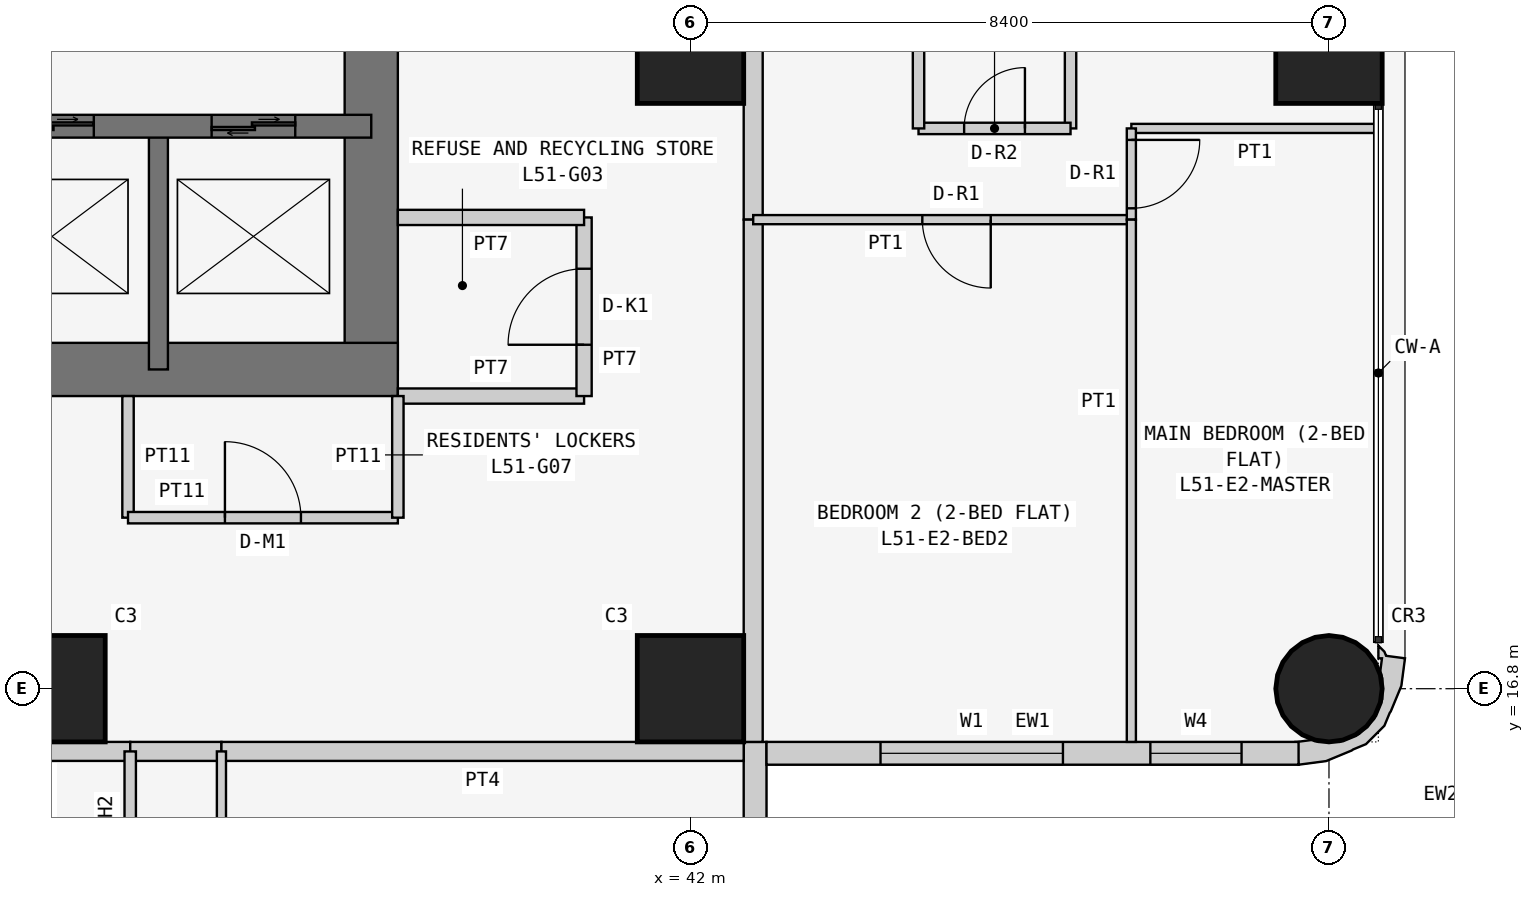
"""IFC4 building model, lengths in metres.
Left out: names, types, materials, properties, quantities, classifications, styles, units other than length and angle.
Written with IfcOpenShell. Run it as: python <this file> out.ifc"""

import sys

from ifc_helpers import new_model, si_unit, direction, frame, frame_2d, origin, origin_2d, place, context, subcontext, project, spatial, polyline, rectangle, circle, outline, extrude, element, fill, save


model = new_model("IFC4")
c1 = context("Model", 3, precision=1e-05, world=origin(), true_north=direction((0.0, 1.0)))
c2 = subcontext(c1, "Body", "Model", "MODEL_VIEW")
j1 = project(units=[si_unit("LENGTHUNIT", "METRE"), si_unit("PLANEANGLEUNIT", "RADIAN")], contexts=[c1])
p1 = place(None, origin())
s1 = spatial("IfcSite", under=j1, at=p1, CompositionType="ELEMENT")
p2 = place(p1, origin())
s2 = spatial("IfcBuilding", under=s1, at=p2, CompositionType="ELEMENT")
p3 = place(p2, frame((0.0, 0.0, 197.7)))
s3 = spatial("IfcBuildingStorey", under=s2, at=p3, CompositionType="ELEMENT", Elevation=197.7)
for number, where, z_axis, x_axis in (
    (1, (33.6, 16.8, 0.0), (0.0, 0.0, 1.0), (1.0, 0.0, 0.0)),
    (2, (42.0, 16.8, 0.0), (0.0, 0.0, 1.0), (1.0, 0.0, 0.0)),
    (3, (42.0, 25.2, 0.0), (0.0, 0.0, 1.0), (1.0, 0.0, 0.0)),
):
    element("IfcColumn", number, at=place(p3, frame(where, z_axis=z_axis, x_axis=x_axis)), inside=s3, PredefinedType="COLUMN", context=c2, shape_type="SweptSolid", body=[
        extrude(rectangle(XDim=1.4, YDim=1.4, at=origin_2d()), origin(), (0.0, 0.0, 1.0), 3.6),
    ])
p4 = place(p3, frame((50.4, 16.8, 0.0), z_axis=(0.0, 0.0, 1.0), x_axis=(1.0, 0.0, 0.0)))
e4 = element("IfcColumn", 4, at=p4, inside=s3, PredefinedType="COLUMN", context=c2, shape_type="SweptSolid", body=[
    extrude(circle(Radius=0.7, at=origin_2d()), origin(), (0.0, 0.0, 1.0), 3.6),
])
p5 = place(p3, frame((50.4, 25.2, 0.0), z_axis=(0.0, 0.0, 1.0), x_axis=(1.0, 0.0, 0.0)))
e5 = element("IfcColumn", 5, at=p5, inside=s3, PredefinedType="COLUMN", context=c2, shape_type="SweptSolid", body=[
    extrude(rectangle(XDim=1.4, YDim=1.4, at=origin_2d()), origin(), (0.0, 0.0, 1.0), 3.6),
])
p6 = place(p3, frame((21.0, 21.0, 0.0), z_axis=(0.0, 0.0, 1.0), x_axis=(1.0, 0.0, 0.0)))
e6 = element("IfcWall", 6, at=p6, inside=s3, PredefinedType="SHEAR", context=c2, shape_type="SweptSolid", body=[
    extrude(rectangle(XDim=17.15, YDim=0.7, at=frame_2d((8.575, 0.0))), origin(), (0.0, 0.0, 1.0), 3.6),
])
p7 = place(p3, frame((37.8, 21.0, 0.0), z_axis=(0.0, 0.0, 1.0), x_axis=(0.0, 1.0, 0.0)))
e7 = element("IfcWall", 7, at=p7, inside=s3, PredefinedType="SHEAR", context=c2, shape_type="SweptSolid", body=[
    extrude(rectangle(XDim=17.15, YDim=0.7, at=frame_2d((8.575, 0.0))), origin(), (0.0, 0.0, 1.0), 3.6),
])
p8 = place(p7, frame((5.2, 0.0, 0.0)))
e8 = element("IfcOpeningElement", 8, at=p8, cuts=e7, PredefinedType="OPENING", context=c2, shape_type="SweptSolid", body=[
    extrude(rectangle(XDim=1.2, YDim=2.1, at=frame_2d((0.6, 1.05))), frame((0.0, 0.36, 0.0), z_axis=(0.0, -1.0, 0.0), x_axis=(1.0, 0.0, 0.0)), (0.0, 0.0, 1.0), 0.72),
])
p9 = place(p3, frame((26.6, 24.2, 0.0), z_axis=(0.0, 0.0, 1.0), x_axis=(1.0, 0.0, 0.0)))
e9 = element("IfcWall", 9, at=p9, inside=s3, PredefinedType="SHEAR", context=c2, shape_type="SweptSolid", body=[
    extrude(rectangle(XDim=11.2, YDim=0.3, at=frame_2d((5.6, 0.0))), origin(), (0.0, 0.0, 1.0), 3.6),
])
p10 = place(p9, frame((0.913, 0.0, 0.0)))
e10 = element("IfcOpeningElement", 10, at=p10, cuts=e9, PredefinedType="OPENING", context=c2, shape_type="SweptSolid", body=[
    extrude(rectangle(XDim=1.0, YDim=2.1, at=frame_2d((0.5, 1.05))), frame((0.0, 0.16, 0.0), z_axis=(0.0, -1.0, 0.0), x_axis=(1.0, 0.0, 0.0)), (0.0, 0.0, 1.0), 0.32),
])
p11 = place(p9, frame((3.75, 0.0, 0.0)))
e11 = element("IfcOpeningElement", 11, at=p11, cuts=e9, PredefinedType="OPENING", context=c2, shape_type="SweptSolid", body=[
    extrude(rectangle(XDim=0.9, YDim=2.1, at=frame_2d((0.45, 1.05))), frame((0.0, 0.16, 0.0), z_axis=(0.0, -1.0, 0.0), x_axis=(1.0, 0.0, 0.0)), (0.0, 0.0, 1.0), 0.32),
])
p12 = place(p9, frame((6.45, 0.0, 0.0)))
e12 = element("IfcOpeningElement", 12, at=p12, cuts=e9, PredefinedType="OPENING", context=c2, shape_type="SweptSolid", body=[
    extrude(rectangle(XDim=1.1, YDim=2.1, at=frame_2d((0.55, 1.05))), frame((0.0, 0.16, 0.0), z_axis=(0.0, -1.0, 0.0), x_axis=(1.0, 0.0, 0.0)), (0.0, 0.0, 1.0), 0.32),
])
p13 = place(p9, frame((9.1, 0.0, 0.0)))
e13 = element("IfcOpeningElement", 13, at=p13, cuts=e9, PredefinedType="OPENING", context=c2, shape_type="SweptSolid", body=[
    extrude(rectangle(XDim=1.1, YDim=2.1, at=frame_2d((0.55, 1.05))), frame((0.0, 0.16, 0.0), z_axis=(0.0, -1.0, 0.0), x_axis=(1.0, 0.0, 0.0)), (0.0, 0.0, 1.0), 0.32),
])
p14 = place(p3, frame((35.0, 21.0, 0.0), z_axis=(0.0, 0.0, 1.0), x_axis=(0.0, 1.0, 0.0)))
e14 = element("IfcWall", 14, at=p14, inside=s3, PredefinedType="SHEAR", context=c2, shape_type="SweptSolid", body=[
    extrude(rectangle(XDim=3.2, YDim=0.25, at=frame_2d((1.6, 0.0))), origin(), (0.0, 0.0, 1.0), 3.6),
])
p15 = place(p3, frame((42.85, 8.8, 0.0), z_axis=(0.0, 0.0, 1.0), x_axis=(0.0, 1.0, 0.0)))
e15 = element("IfcWall", 15, at=p15, inside=s3, PredefinedType="SOLIDWALL", context=c2, shape_type="SweptSolid", body=[
    extrude(rectangle(XDim=7.3, YDim=0.3, at=frame_2d((3.65, 0.0))), origin(), (0.0, 0.0, 1.0), 3.45),
])
p16 = place(p15, frame((3.1, 0.0, 0.9)))
e16 = element("IfcOpeningElement", 16, at=p16, cuts=e15, PredefinedType="OPENING", context=c2, shape_type="SweptSolid", body=[
    extrude(rectangle(XDim=2.4, YDim=1.5, at=frame_2d((1.2, 0.75))), frame((0.0, 0.16, 0.0), z_axis=(0.0, -1.0, 0.0), x_axis=(1.0, 0.0, 0.0)), (0.0, 0.0, 1.0), 0.32),
])
p17 = place(p15, frame((0.75, 0.0, 0.9)))
e17 = element("IfcOpeningElement", 17, at=p17, cuts=e15, PredefinedType="OPENING", context=c2, shape_type="SweptSolid", body=[
    extrude(rectangle(XDim=1.2, YDim=1.5, at=frame_2d((0.6, 0.75))), frame((0.0, 0.16, 0.0), z_axis=(0.0, -1.0, 0.0), x_axis=(1.0, 0.0, 0.0)), (0.0, 0.0, 1.0), 0.32),
])
p18 = place(p3, frame((43.0, 15.95, 0.0), z_axis=(0.0, 0.0, 1.0), x_axis=(1.0, 0.0, 0.0)))
e18 = element("IfcWall", 18, at=p18, inside=s3, PredefinedType="SOLIDWALL", context=c2, shape_type="SweptSolid", body=[
    extrude(rectangle(XDim=7.0, YDim=0.3, at=frame_2d((3.5, 0.0))), origin(), (0.0, 0.0, 1.0), 3.45),
])
p19 = place(p18, frame((1.5, 0.0, 0.9)))
e19 = element("IfcOpeningElement", 19, at=p19, cuts=e18, PredefinedType="OPENING", context=c2, shape_type="SweptSolid", body=[
    extrude(rectangle(XDim=2.4, YDim=1.5, at=frame_2d((1.2, 0.75))), frame((0.0, 0.16, 0.0), z_axis=(0.0, -1.0, 0.0), x_axis=(1.0, 0.0, 0.0)), (0.0, 0.0, 1.0), 0.32),
])
p20 = place(p18, frame((5.05, 0.0, 0.9)))
e20 = element("IfcOpeningElement", 20, at=p20, cuts=e18, PredefinedType="OPENING", context=c2, shape_type="SweptSolid", body=[
    extrude(rectangle(XDim=1.2, YDim=1.5, at=frame_2d((0.6, 0.75))), frame((0.0, 0.16, 0.0), z_axis=(0.0, -1.0, 0.0), x_axis=(1.0, 0.0, 0.0)), (0.0, 0.0, 1.0), 0.32),
])
p21 = place(p3, frame((50.11, 16.076, 0.0), z_axis=(0.0, 0.0, 1.0), x_axis=(0.898030234854, -0.439933741929, 0.0)))
e21 = element("IfcWall", 21, at=p21, inside=s3, PredefinedType="SOLIDWALL", context=c2, shape_type="SweptSolid", body=[
    extrude(outline(polyline([(0.664, 1.577), (0.426, 1.497), (0.382, 1.536), (0.276, 1.572), (0.349, 1.423), (0.392, 1.444), (0.453, 1.261), (0.51, 1.211), (0.632, 0.961), (0.65, 0.683), (0.56, 0.419), (0.375, 0.21), (0.125, 0.087), (0.05, 0.082), (-0.128, -0.035), (-0.145, -0.044), (0.022, -0.296), (0.327, -0.094), (0.568, 0.18), (0.577, 0.199), (0.7, 0.337), (0.811, 0.661), (0.799, 0.846), (0.803, 0.866), (0.78, 1.231), (0.664, 1.577)])), origin(), (0.0, 0.0, 1.0), 3.45),
])
p22 = place(p3, frame((38.15, 20.65, 0.0), z_axis=(0.0, 0.0, 1.0), x_axis=(1.0, 0.0, 0.0)))
e22 = element("IfcWall", 22, at=p22, inside=s3, PredefinedType="PARTITIONING", context=c2, shape_type="SweptSolid", body=[
    extrude(rectangle(XDim=2.45, YDim=0.2, at=frame_2d((1.225, 0.0))), origin(), (0.0, 0.0, 1.0), 3.45),
])
p23 = place(p3, frame((40.6, 20.65, 0.0), z_axis=(0.0, 0.0, 1.0), x_axis=(0.0, 1.0, 0.0)))
e23 = element("IfcWall", 23, at=p23, inside=s3, PredefinedType="PARTITIONING", context=c2, shape_type="SweptSolid", body=[
    extrude(rectangle(XDim=2.35, YDim=0.2, at=frame_2d((1.175, 0.0))), origin(), (0.0, 0.0, 1.0), 3.45),
])
p24 = place(p23, frame((0.675, 0.0, 0.0)))
e24 = element("IfcOpeningElement", 24, at=p24, cuts=e23, PredefinedType="OPENING", context=c2, shape_type="SweptSolid", body=[
    extrude(rectangle(XDim=1.0, YDim=2.1, at=frame_2d((0.5, 1.05))), frame((0.0, 0.11, 0.0), z_axis=(0.0, -1.0, 0.0), x_axis=(1.0, 0.0, 0.0)), (0.0, 0.0, 1.0), 0.22),
])
p25 = place(p3, frame((40.6, 23.0, 0.0), z_axis=(0.0, 0.0, 1.0), x_axis=(-1.0, 0.0, 0.0)))
e25 = element("IfcWall", 25, at=p25, inside=s3, PredefinedType="PARTITIONING", context=c2, shape_type="SweptSolid", body=[
    extrude(rectangle(XDim=2.45, YDim=0.2, at=frame_2d((1.225, 0.0))), origin(), (0.0, 0.0, 1.0), 3.45),
])
p26 = place(p3, frame((34.6, 20.65, 0.0), z_axis=(0.0, 0.0, 1.0), x_axis=(0.0, -1.0, 0.0)))
e26 = element("IfcWall", 26, at=p26, inside=s3, PredefinedType="PARTITIONING", context=c2, shape_type="SweptSolid", body=[
    extrude(rectangle(XDim=1.6, YDim=0.15, at=frame_2d((0.8, 0.0))), origin(), (0.0, 0.0, 1.0), 3.45),
])
p27 = place(p3, frame((34.6, 19.05, 0.0), z_axis=(0.0, 0.0, 1.0), x_axis=(1.0, 0.0, 0.0)))
e27 = element("IfcWall", 27, at=p27, inside=s3, PredefinedType="PARTITIONING", context=c2, shape_type="SweptSolid", body=[
    extrude(rectangle(XDim=3.55, YDim=0.15, at=frame_2d((1.775, 0.0))), origin(), (0.0, 0.0, 1.0), 3.45),
])
p28 = place(p27, frame((1.275, 0.0, 0.0)))
e28 = element("IfcOpeningElement", 28, at=p28, cuts=e27, PredefinedType="OPENING", context=c2, shape_type="SweptSolid", body=[
    extrude(rectangle(XDim=1.0, YDim=2.1, at=frame_2d((0.5, 1.05))), frame((0.0, 0.085, 0.0), z_axis=(0.0, -1.0, 0.0), x_axis=(1.0, 0.0, 0.0)), (0.0, 0.0, 1.0), 0.17),
])
p29 = place(p3, frame((38.15, 19.05, 0.0), z_axis=(0.0, 0.0, 1.0), x_axis=(0.0, 1.0, 0.0)))
e29 = element("IfcWall", 29, at=p29, inside=s3, PredefinedType="PARTITIONING", context=c2, shape_type="SweptSolid", body=[
    extrude(rectangle(XDim=1.6, YDim=0.15, at=frame_2d((0.8, 0.0))), origin(), (0.0, 0.0, 1.0), 3.45),
])
p30 = place(p3, frame((42.825, 29.4, 0.0), z_axis=(0.0, 0.0, 1.0), x_axis=(0.0, -1.0, 0.0)))
e30 = element("IfcWall", 30, at=p30, inside=s3, PredefinedType="PARTITIONING", context=c2, shape_type="SweptSolid", body=[
    extrude(rectangle(XDim=6.429, YDim=0.25, at=frame_2d((3.214, 0.0))), origin(), (0.0, 0.0, 1.0), 3.45),
])
p31 = place(p30, frame((0.5, 0.0, 0.0)))
e31 = element("IfcOpeningElement", 31, at=p31, cuts=e30, PredefinedType="OPENING", context=c2, shape_type="SweptSolid", body=[
    extrude(rectangle(XDim=1.0, YDim=2.1, at=frame_2d((0.5, 1.05))), frame((0.0, 0.135, 0.0), z_axis=(0.0, -1.0, 0.0), x_axis=(1.0, 0.0, 0.0)), (0.0, 0.0, 1.0), 0.27),
])
p32 = place(p3, frame((42.825, 22.971, 0.0), z_axis=(0.0, 0.0, 1.0), x_axis=(0.0, -1.0, 0.0)))
e32 = element("IfcWall", 32, at=p32, inside=s3, PredefinedType="PARTITIONING", context=c2, shape_type="SweptSolid", body=[
    extrude(rectangle(XDim=6.871, YDim=0.25, at=frame_2d((3.436, 0.0))), origin(), (0.0, 0.0, 1.0), 3.45),
])
p33 = place(p3, frame((34.629, 15.975, 0.0), z_axis=(0.0, 0.0, 1.0), x_axis=(-1.0, 0.0, 0.0)))
e33 = element("IfcWall", 33, at=p33, inside=s3, PredefinedType="PARTITIONING", context=c2, shape_type="SweptSolid", body=[
    extrude(rectangle(XDim=2.629, YDim=0.25, at=frame_2d((1.314, 0.0))), origin(), (0.0, 0.0, 1.0), 3.45),
])
p34 = place(p3, frame((35.829, 15.975, 0.0), z_axis=(0.0, 0.0, 1.0), x_axis=(-1.0, 0.0, 0.0)))
e34 = element("IfcWall", 34, at=p34, inside=s3, PredefinedType="PARTITIONING", context=c2, shape_type="SweptSolid", body=[
    extrude(rectangle(XDim=1.2, YDim=0.25, at=frame_2d((0.6, 0.0))), origin(), (0.0, 0.0, 1.0), 3.45),
])
p35 = place(p3, frame((42.7, 15.975, 0.0), z_axis=(0.0, 0.0, 1.0), x_axis=(-1.0, 0.0, 0.0)))
e35 = element("IfcWall", 35, at=p35, inside=s3, PredefinedType="PARTITIONING", context=c2, shape_type="SweptSolid", body=[
    extrude(rectangle(XDim=6.871, YDim=0.25, at=frame_2d((3.436, 0.0))), origin(), (0.0, 0.0, 1.0), 3.45),
])
p36 = place(p3, frame((47.0, 29.4, 0.0), z_axis=(0.0, 0.0, 1.0), x_axis=(0.0, -1.0, 0.0)))
e36 = element("IfcWall", 36, at=p36, inside=s3, PredefinedType="PARTITIONING", context=c2, shape_type="SweptSolid", body=[
    extrude(rectangle(XDim=5.229, YDim=0.15, at=frame_2d((2.615, 0.0))), origin(), (0.0, 0.0, 1.0), 3.45),
])
p37 = place(p3, frame((47.0, 24.171, 0.0), z_axis=(0.0, 0.0, 1.0), x_axis=(-1.0, 0.0, 0.0)))
e37 = element("IfcWall", 37, at=p37, inside=s3, PredefinedType="PARTITIONING", context=c2, shape_type="SweptSolid", body=[
    extrude(rectangle(XDim=2.0, YDim=0.15, at=frame_2d((1.0, 0.0))), origin(), (0.0, 0.0, 1.0), 3.45),
])
p38 = place(p37, frame((0.6, 0.0, 0.0)))
e38 = element("IfcOpeningElement", 38, at=p38, cuts=e37, PredefinedType="OPENING", context=c2, shape_type="SweptSolid", body=[
    extrude(rectangle(XDim=0.8, YDim=2.1, at=frame_2d((0.4, 1.05))), frame((0.0, 0.085, 0.0), z_axis=(0.0, -1.0, 0.0), x_axis=(1.0, 0.0, 0.0)), (0.0, 0.0, 1.0), 0.17),
])
p39 = place(p3, frame((45.0, 24.171, 0.0), z_axis=(0.0, 0.0, 1.0), x_axis=(0.0, 1.0, 0.0)))
e39 = element("IfcWall", 39, at=p39, inside=s3, PredefinedType="PARTITIONING", context=c2, shape_type="SweptSolid", body=[
    extrude(rectangle(XDim=5.229, YDim=0.15, at=frame_2d((2.615, 0.0))), origin(), (0.0, 0.0, 1.0), 3.45),
])
p40 = place(p3, frame((47.8, 22.971, 0.0), z_axis=(0.0, 0.0, 1.0), x_axis=(-1.0, 0.0, 0.0)))
e40 = element("IfcWall", 40, at=p40, inside=s3, PredefinedType="PARTITIONING", context=c2, shape_type="SweptSolid", body=[
    extrude(rectangle(XDim=4.975, YDim=0.12, at=frame_2d((2.488, 0.0))), origin(), (0.0, 0.0, 1.0), 3.45),
])
p41 = place(p40, frame((1.85, 0.0, 0.0)))
e41 = element("IfcOpeningElement", 41, at=p41, cuts=e40, PredefinedType="OPENING", context=c2, shape_type="SweptSolid", body=[
    extrude(rectangle(XDim=0.9, YDim=2.1, at=frame_2d((0.45, 1.05))), frame((0.0, 0.07, 0.0), z_axis=(0.0, -1.0, 0.0), x_axis=(1.0, 0.0, 0.0)), (0.0, 0.0, 1.0), 0.14),
])
p42 = place(p3, frame((51.05, 24.171, 0.0), z_axis=(0.0, 0.0, 1.0), x_axis=(-1.0, 0.0, 0.0)))
e42 = element("IfcWall", 42, at=p42, inside=s3, PredefinedType="PARTITIONING", context=c2, shape_type="SweptSolid", body=[
    extrude(rectangle(XDim=3.25, YDim=0.12, at=frame_2d((1.625, 0.0))), origin(), (0.0, 0.0, 1.0), 3.45),
])
p43 = place(p3, frame((47.8, 24.171, 0.0), z_axis=(0.0, 0.0, 1.0), x_axis=(0.0, -1.0, 0.0)))
e43 = element("IfcWall", 43, at=p43, inside=s3, PredefinedType="PARTITIONING", context=c2, shape_type="SweptSolid", body=[
    extrude(rectangle(XDim=1.2, YDim=0.12, at=frame_2d((0.6, 0.0))), origin(), (0.0, 0.0, 1.0), 3.45),
])
p44 = place(p43, frame((0.151, 0.0, 0.0)))
e44 = element("IfcOpeningElement", 44, at=p44, cuts=e43, PredefinedType="OPENING", context=c2, shape_type="SweptSolid", body=[
    extrude(rectangle(XDim=0.9, YDim=2.1, at=frame_2d((0.45, 1.05))), frame((0.0, 0.07, 0.0), z_axis=(0.0, -1.0, 0.0), x_axis=(1.0, 0.0, 0.0)), (0.0, 0.0, 1.0), 0.14),
])
p45 = place(p3, frame((47.8, 22.971, 0.0), z_axis=(0.0, 0.0, 1.0), x_axis=(0.0, -1.0, 0.0)))
e45 = element("IfcWall", 45, at=p45, inside=s3, PredefinedType="PARTITIONING", context=c2, shape_type="SweptSolid", body=[
    extrude(rectangle(XDim=6.871, YDim=0.12, at=frame_2d((3.436, 0.0))), origin(), (0.0, 0.0, 1.0), 3.45),
])
p46 = place(p3, frame((34.629, 12.8, 0.0), z_axis=(0.0, 0.0, 1.0), x_axis=(0.0, 1.0, 0.0)))
e46 = element("IfcWall", 46, at=p46, inside=s3, PredefinedType="PARTITIONING", context=c2, shape_type="SweptSolid", body=[
    extrude(rectangle(XDim=3.175, YDim=0.15, at=frame_2d((1.587, 0.0))), origin(), (0.0, 0.0, 1.0), 3.45),
])
p47 = place(p3, frame((35.829, 15.975, 0.0), z_axis=(0.0, 0.0, 1.0), x_axis=(0.0, -1.0, 0.0)))
e47 = element("IfcWall", 47, at=p47, inside=s3, PredefinedType="PARTITIONING", context=c2, shape_type="SweptSolid", body=[
    extrude(rectangle(XDim=4.975, YDim=0.12, at=frame_2d((2.488, 0.0))), origin(), (0.0, 0.0, 1.0), 3.45),
])
p48 = place(p47, frame((2.125, 0.0, 0.0)))
e48 = element("IfcOpeningElement", 48, at=p48, cuts=e47, PredefinedType="OPENING", context=c2, shape_type="SweptSolid", body=[
    extrude(rectangle(XDim=0.9, YDim=2.1, at=frame_2d((0.45, 1.05))), frame((0.0, 0.07, 0.0), z_axis=(0.0, -1.0, 0.0), x_axis=(1.0, 0.0, 0.0)), (0.0, 0.0, 1.0), 0.14),
])
p49 = place(p19, origin())
e49 = element("IfcWindow", 49, at=p49, inside=s3, PartitioningType="SINGLE_PANEL", PredefinedType="WINDOW", context=c2, shape_type="SweptSolid", body=[
    extrude(rectangle(XDim=2.4, YDim=1.5, at=frame_2d((1.2, 0.75))), frame((0.0, 0.03, 0.0), z_axis=(0.0, -1.0, 0.0), x_axis=(1.0, 0.0, 0.0)), (0.0, 0.0, 1.0), 0.06),
])
fill(e19, e49)
p50 = place(p20, origin())
e50 = element("IfcWindow", 50, at=p50, inside=s3, PartitioningType="SINGLE_PANEL", PredefinedType="WINDOW", context=c2, shape_type="SweptSolid", body=[
    extrude(rectangle(XDim=1.2, YDim=1.5, at=frame_2d((0.6, 0.75))), frame((0.0, 0.03, 0.0), z_axis=(0.0, -1.0, 0.0), x_axis=(1.0, 0.0, 0.0)), (0.0, 0.0, 1.0), 0.06),
])
fill(e20, e50)
p51 = place(p24, origin())
e51 = element("IfcDoor", 51, at=p51, inside=s3, OperationType="SINGLE_SWING_LEFT", PredefinedType="DOOR", context=c2, shape_type="SweptSolid", body=[
    extrude(rectangle(XDim=1.0, YDim=2.1, at=frame_2d((0.5, 1.05))), frame((0.0, 0.025, 0.0), z_axis=(0.0, -1.0, 0.0), x_axis=(1.0, 0.0, 0.0)), (0.0, 0.0, 1.0), 0.05),
])
fill(e24, e51)
p52 = place(p28, origin())
e52 = element("IfcDoor", 52, at=p52, inside=s3, OperationType="SINGLE_SWING_LEFT", PredefinedType="DOOR", context=c2, shape_type="SweptSolid", body=[
    extrude(rectangle(XDim=1.0, YDim=2.1, at=frame_2d((0.5, 1.05))), frame((0.0, 0.025, 0.0), z_axis=(0.0, -1.0, 0.0), x_axis=(1.0, 0.0, 0.0)), (0.0, 0.0, 1.0), 0.05),
])
fill(e28, e52)
p53 = place(p38, frame((0.8, 0.0, 0.0), z_axis=(0.0, 0.0, 1.0), x_axis=(-1.0, 0.0, 0.0)))
e53 = element("IfcDoor", 53, at=p53, inside=s3, OperationType="SINGLE_SWING_RIGHT", PredefinedType="DOOR", context=c2, shape_type="SweptSolid", body=[
    extrude(rectangle(XDim=0.8, YDim=2.1, at=frame_2d((0.4, 1.05))), frame((0.0, 0.025, 0.0), z_axis=(0.0, -1.0, 0.0), x_axis=(1.0, 0.0, 0.0)), (0.0, 0.0, 1.0), 0.05),
])
fill(e38, e53)
p54 = place(p41, origin())
e54 = element("IfcDoor", 54, at=p54, inside=s3, OperationType="SINGLE_SWING_LEFT", PredefinedType="DOOR", context=c2, shape_type="SweptSolid", body=[
    extrude(rectangle(XDim=0.9, YDim=2.1, at=frame_2d((0.45, 1.05))), frame((0.0, 0.025, 0.0), z_axis=(0.0, -1.0, 0.0), x_axis=(1.0, 0.0, 0.0)), (0.0, 0.0, 1.0), 0.05),
])
fill(e41, e54)
p55 = place(p44, origin())
e55 = element("IfcDoor", 55, at=p55, inside=s3, OperationType="SINGLE_SWING_LEFT", PredefinedType="DOOR", context=c2, shape_type="SweptSolid", body=[
    extrude(rectangle(XDim=0.9, YDim=2.1, at=frame_2d((0.45, 1.05))), frame((0.0, 0.025, 0.0), z_axis=(0.0, -1.0, 0.0), x_axis=(1.0, 0.0, 0.0)), (0.0, 0.0, 1.0), 0.05),
])
fill(e44, e55)
p56 = place(p12, origin())
e56 = element("IfcDoor", 56, at=p56, inside=s3, OperationType="DOUBLE_DOOR_SLIDING", PredefinedType="DOOR", context=c2, shape_type="SweptSolid", body=[
    extrude(rectangle(XDim=1.1, YDim=2.1, at=frame_2d((0.55, 1.05))), frame((0.0, 0.025, 0.0), z_axis=(0.0, -1.0, 0.0), x_axis=(1.0, 0.0, 0.0)), (0.0, 0.0, 1.0), 0.05),
])
fill(e12, e56)
p57 = place(p13, origin())
e57 = element("IfcDoor", 57, at=p57, inside=s3, OperationType="DOUBLE_DOOR_SLIDING", PredefinedType="DOOR", context=c2, shape_type="SweptSolid", body=[
    extrude(rectangle(XDim=1.1, YDim=2.1, at=frame_2d((0.55, 1.05))), frame((0.0, 0.025, 0.0), z_axis=(0.0, -1.0, 0.0), x_axis=(1.0, 0.0, 0.0)), (0.0, 0.0, 1.0), 0.05),
])
fill(e13, e57)
save(model, sys.argv[1])
